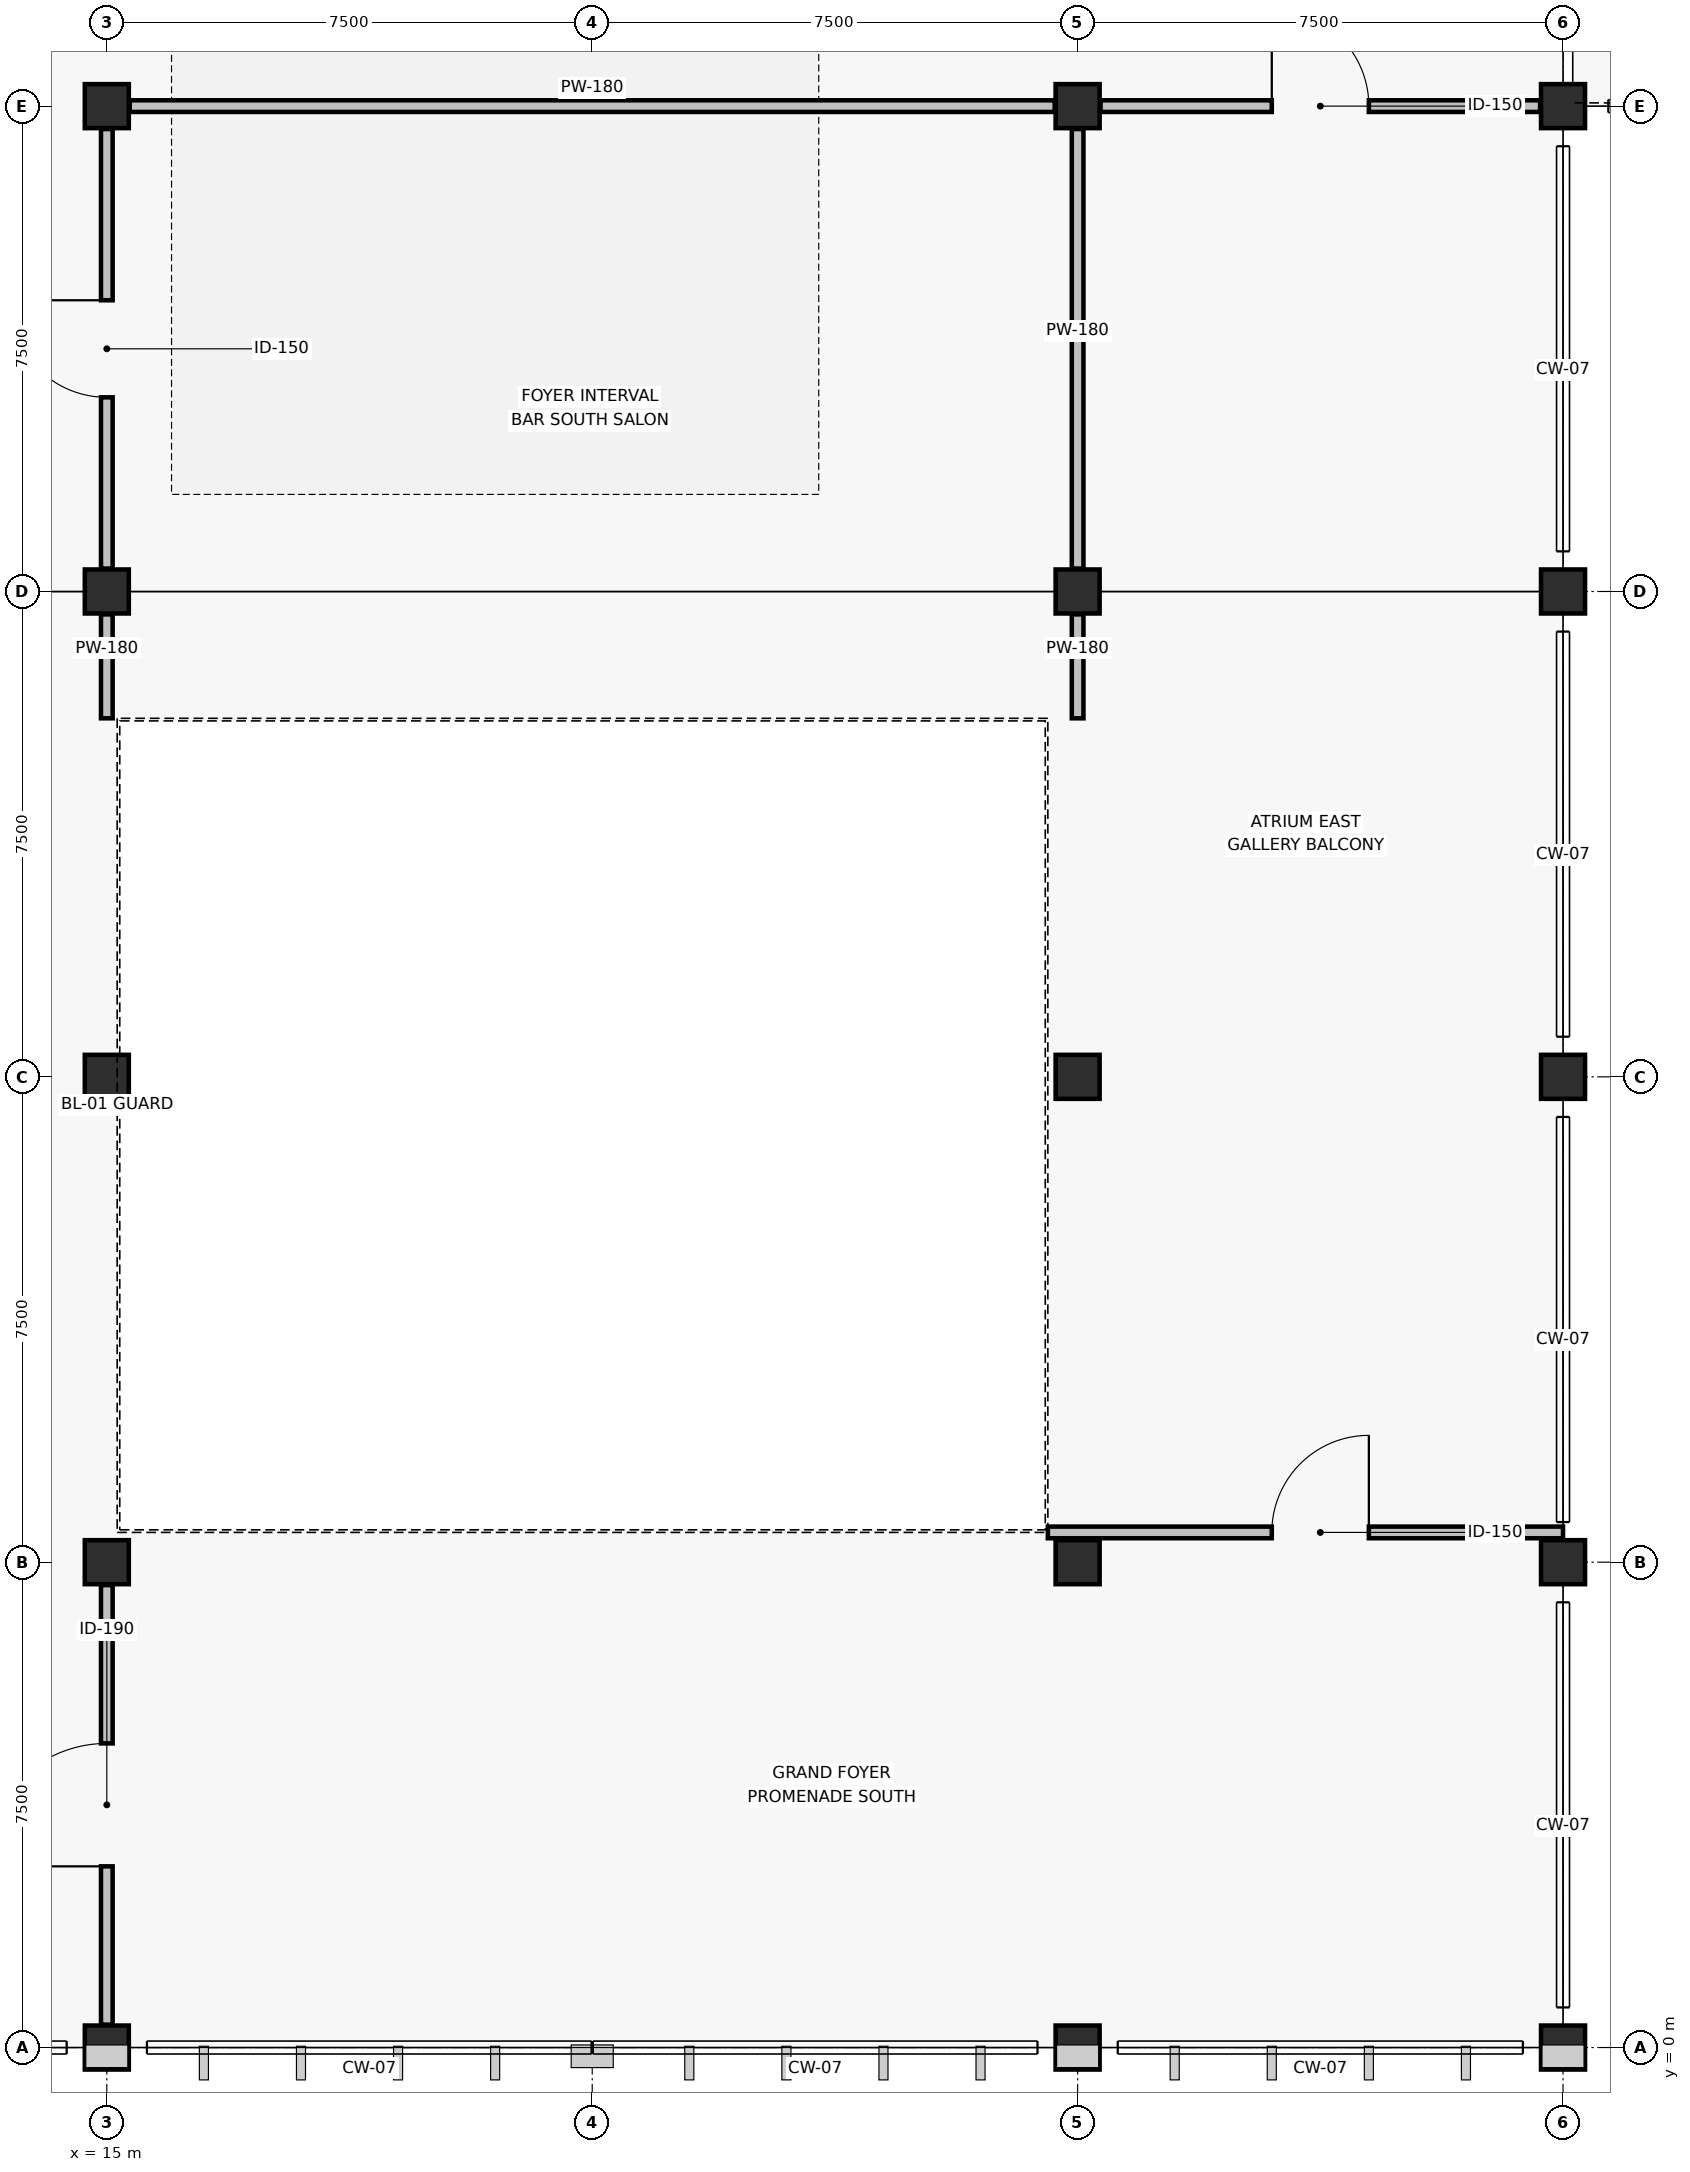
"""IFC4 building model, lengths in metres.
Left out: names, types, materials, properties, quantities, classifications, styles, units other than length and angle.
Written with IfcOpenShell. Run it as: python <this file> out.ifc"""

import sys

from ifc_helpers import new_model, si_unit, direction, frame, frame_2d, origin, origin_2d, place, context, subcontext, project, spatial, rectangle, extrude, element, fill, save


model = new_model("IFC4")
c1 = context("Model", 3, precision=1e-05, world=origin(), true_north=direction((0.0, 1.0)))
c2 = subcontext(c1, "Body", "Model", "MODEL_VIEW")
j1 = project(units=[si_unit("LENGTHUNIT", "METRE"), si_unit("PLANEANGLEUNIT", "RADIAN")], contexts=[c1])
p1 = place(None, origin())
s1 = spatial("IfcSite", under=j1, at=p1, CompositionType="ELEMENT")
p2 = place(p1, origin())
s2 = spatial("IfcBuilding", under=s1, at=p2, CompositionType="ELEMENT")
p3 = place(p2, frame((0.0, 0.0, 4.8)))
s3 = spatial("IfcBuildingStorey", under=s2, at=p3, CompositionType="ELEMENT", Elevation=4.8)
for number, where, z_axis, x_axis in (
    (1, (15.0, 0.0, 0.0), (0.0, 0.0, 1.0), (1.0, 0.0, 0.0)),
    (2, (15.0, 7.5, 0.0), (0.0, 0.0, 1.0), (1.0, 0.0, 0.0)),
    (3, (15.0, 15.0, 0.0), (0.0, 0.0, 1.0), (1.0, 0.0, 0.0)),
    (4, (15.0, 22.5, 0.0), (0.0, 0.0, 1.0), (1.0, 0.0, 0.0)),
    (5, (15.0, 30.0, 0.0), (0.0, 0.0, 1.0), (1.0, 0.0, 0.0)),
    (6, (30.0, 0.0, 0.0), (0.0, 0.0, 1.0), (1.0, 0.0, 0.0)),
    (7, (30.0, 7.5, 0.0), (0.0, 0.0, 1.0), (1.0, 0.0, 0.0)),
    (8, (30.0, 15.0, 0.0), (0.0, 0.0, 1.0), (1.0, 0.0, 0.0)),
    (9, (30.0, 22.5, 0.0), (0.0, 0.0, 1.0), (1.0, 0.0, 0.0)),
    (10, (30.0, 30.0, 0.0), (0.0, 0.0, 1.0), (1.0, 0.0, 0.0)),
    (11, (37.5, 0.0, 0.0), (0.0, 0.0, 1.0), (1.0, 0.0, 0.0)),
    (12, (37.5, 7.5, 0.0), (0.0, 0.0, 1.0), (1.0, 0.0, 0.0)),
    (13, (37.5, 15.0, 0.0), (0.0, 0.0, 1.0), (1.0, 0.0, 0.0)),
    (14, (37.5, 22.5, 0.0), (0.0, 0.0, 1.0), (1.0, 0.0, 0.0)),
    (15, (37.5, 30.0, 0.0), (0.0, 0.0, 1.0), (1.0, 0.0, 0.0)),
):
    element("IfcColumn", number, at=place(p3, frame(where, z_axis=z_axis, x_axis=x_axis)), inside=s3, PredefinedType="COLUMN", context=c2, shape_type="SweptSolid", body=[
        extrude(rectangle(XDim=0.68, YDim=0.68, at=origin_2d()), origin(), (0.0, 0.0, 1.0), 4.2),
    ])
p4 = place(p3, frame((29.54, 7.96, 0.0), z_axis=(0.0, 0.0, 1.0), x_axis=(1.0, 0.0, 0.0)))
e16 = element("IfcWall", 16, at=p4, inside=s3, PredefinedType="PARTITIONING", context=c2, shape_type="SweptSolid", body=[
    extrude(rectangle(XDim=7.96, YDim=0.18, at=frame_2d((3.98, 0.0))), origin(), (0.0, 0.0, 1.0), 2.89),
])
p5 = place(p4, frame((3.46, 0.0, 0.0)))
e17 = element("IfcOpeningElement", 17, at=p5, cuts=e16, PredefinedType="OPENING", context=c2, shape_type="SweptSolid", body=[
    extrude(rectangle(XDim=1.5, YDim=2.16, at=frame_2d((0.75, 1.08))), frame((0.0, 0.1, 0.0), z_axis=(0.0, -1.0, 0.0), x_axis=(1.0, 0.0, 0.0)), (0.0, 0.0, 1.0), 0.2),
])
p6 = place(p3, frame((15.354, 30.0, 0.0), z_axis=(0.0, 0.0, 1.0), x_axis=(1.0, 0.0, 0.0)))
e18 = element("IfcWall", 18, at=p6, inside=s3, PredefinedType="PARTITIONING", context=c2, shape_type="SweptSolid", body=[
    extrude(rectangle(XDim=14.292, YDim=0.18, at=frame_2d((7.146, 0.0))), origin(), (0.0, 0.0, 1.0), 2.84),
])
p7 = place(p3, frame((30.354, 30.0, 0.0), z_axis=(0.0, 0.0, 1.0), x_axis=(1.0, 0.0, 0.0)))
e19 = element("IfcWall", 19, at=p7, inside=s3, PredefinedType="PARTITIONING", context=c2, shape_type="SweptSolid", body=[
    extrude(rectangle(XDim=6.792, YDim=0.18, at=frame_2d((3.396, 0.0))), origin(), (0.0, 0.0, 1.0), 2.84),
])
p8 = place(p7, frame((2.646, 0.0, 0.0)))
e20 = element("IfcOpeningElement", 20, at=p8, cuts=e19, PredefinedType="OPENING", context=c2, shape_type="SweptSolid", body=[
    extrude(rectangle(XDim=1.5, YDim=2.16, at=frame_2d((0.75, 1.08))), frame((0.0, 0.1, 0.0), z_axis=(0.0, -1.0, 0.0), x_axis=(1.0, 0.0, 0.0)), (0.0, 0.0, 1.0), 0.2),
])
p9 = place(p3, frame((30.0, 20.54, 0.0), z_axis=(0.0, 0.0, 1.0), x_axis=(0.0, 1.0, 0.0)))
e21 = element("IfcWall", 21, at=p9, inside=s3, PredefinedType="PARTITIONING", context=c2, shape_type="SweptSolid", body=[
    extrude(rectangle(XDim=1.606, YDim=0.18, at=frame_2d((0.803, 0.0))), origin(), (0.0, 0.0, 1.0), 2.89),
])
p10 = place(p3, frame((30.0, 22.854, 0.0), z_axis=(0.0, 0.0, 1.0), x_axis=(0.0, 1.0, 0.0)))
e22 = element("IfcWall", 22, at=p10, inside=s3, PredefinedType="PARTITIONING", context=c2, shape_type="SweptSolid", body=[
    extrude(rectangle(XDim=6.792, YDim=0.18, at=frame_2d((3.396, 0.0))), origin(), (0.0, 0.0, 1.0), 2.84),
])
p11 = place(p3, frame((15.0, 0.354, 0.0), z_axis=(0.0, 0.0, 1.0), x_axis=(0.0, 1.0, 0.0)))
e23 = element("IfcWall", 23, at=p11, inside=s3, PredefinedType="PARTITIONING", context=c2, shape_type="SweptSolid", body=[
    extrude(rectangle(XDim=6.792, YDim=0.18, at=frame_2d((3.396, 0.0))), origin(), (0.0, 0.0, 1.0), 2.89),
])
p12 = place(p11, frame((2.446, 0.0, 0.0)))
e24 = element("IfcOpeningElement", 24, at=p12, cuts=e23, PredefinedType="OPENING", context=c2, shape_type="SweptSolid", body=[
    extrude(rectangle(XDim=1.9, YDim=2.18, at=frame_2d((0.95, 1.09))), frame((0.0, 0.1, 0.0), z_axis=(0.0, -1.0, 0.0), x_axis=(1.0, 0.0, 0.0)), (0.0, 0.0, 1.0), 0.2),
])
p13 = place(p3, frame((15.0, 20.54, 0.0), z_axis=(0.0, 0.0, 1.0), x_axis=(0.0, 1.0, 0.0)))
e25 = element("IfcWall", 25, at=p13, inside=s3, PredefinedType="PARTITIONING", context=c2, shape_type="SweptSolid", body=[
    extrude(rectangle(XDim=1.606, YDim=0.18, at=frame_2d((0.803, 0.0))), origin(), (0.0, 0.0, 1.0), 2.89),
])
p14 = place(p3, frame((15.0, 22.854, 0.0), z_axis=(0.0, 0.0, 1.0), x_axis=(0.0, 1.0, 0.0)))
e26 = element("IfcWall", 26, at=p14, inside=s3, PredefinedType="PARTITIONING", context=c2, shape_type="SweptSolid", body=[
    extrude(rectangle(XDim=6.792, YDim=0.18, at=frame_2d((3.396, 0.0))), origin(), (0.0, 0.0, 1.0), 2.89),
])
p15 = place(p14, frame((2.646, 0.0, 0.0)))
e27 = element("IfcOpeningElement", 27, at=p15, cuts=e26, PredefinedType="OPENING", context=c2, shape_type="SweptSolid", body=[
    extrude(rectangle(XDim=1.5, YDim=2.16, at=frame_2d((0.75, 1.08))), frame((0.0, 0.1, 0.0), z_axis=(0.0, -1.0, 0.0), x_axis=(1.0, 0.0, 0.0)), (0.0, 0.0, 1.0), 0.2),
])
p16 = place(p5, origin())
e28 = element("IfcDoor", 28, at=p16, inside=s3, OperationType="SINGLE_SWING_RIGHT", PredefinedType="DOOR", context=c2, shape_type="SweptSolid", body=[
    extrude(rectangle(XDim=1.5, YDim=2.16, at=frame_2d((0.75, 1.08))), frame((0.0, 0.025, 0.0), z_axis=(0.0, -1.0, 0.0), x_axis=(1.0, 0.0, 0.0)), (0.0, 0.0, 1.0), 0.05),
])
fill(e17, e28)
p17 = place(p8, origin())
e29 = element("IfcDoor", 29, at=p17, inside=s3, OperationType="SINGLE_SWING_LEFT", PredefinedType="DOOR", context=c2, shape_type="SweptSolid", body=[
    extrude(rectangle(XDim=1.5, YDim=2.16, at=frame_2d((0.75, 1.08))), frame((0.0, 0.025, 0.0), z_axis=(0.0, -1.0, 0.0), x_axis=(1.0, 0.0, 0.0)), (0.0, 0.0, 1.0), 0.05),
])
fill(e20, e29)
p18 = place(p12, origin())
e30 = element("IfcDoor", 30, at=p18, inside=s3, OperationType="SINGLE_SWING_LEFT", PredefinedType="DOOR", context=c2, shape_type="SweptSolid", body=[
    extrude(rectangle(XDim=1.9, YDim=2.18, at=frame_2d((0.95, 1.09))), frame((0.0, 0.025, 0.0), z_axis=(0.0, -1.0, 0.0), x_axis=(1.0, 0.0, 0.0)), (0.0, 0.0, 1.0), 0.05),
])
fill(e24, e30)
p19 = place(p15, origin())
e31 = element("IfcDoor", 31, at=p19, inside=s3, OperationType="SINGLE_SWING_RIGHT", PredefinedType="DOOR", context=c2, shape_type="SweptSolid", body=[
    extrude(rectangle(XDim=1.5, YDim=2.16, at=frame_2d((0.75, 1.08))), frame((0.0, 0.025, 0.0), z_axis=(0.0, -1.0, 0.0), x_axis=(1.0, 0.0, 0.0)), (0.0, 0.0, 1.0), 0.05),
])
fill(e27, e31)
save(model, sys.argv[1])
